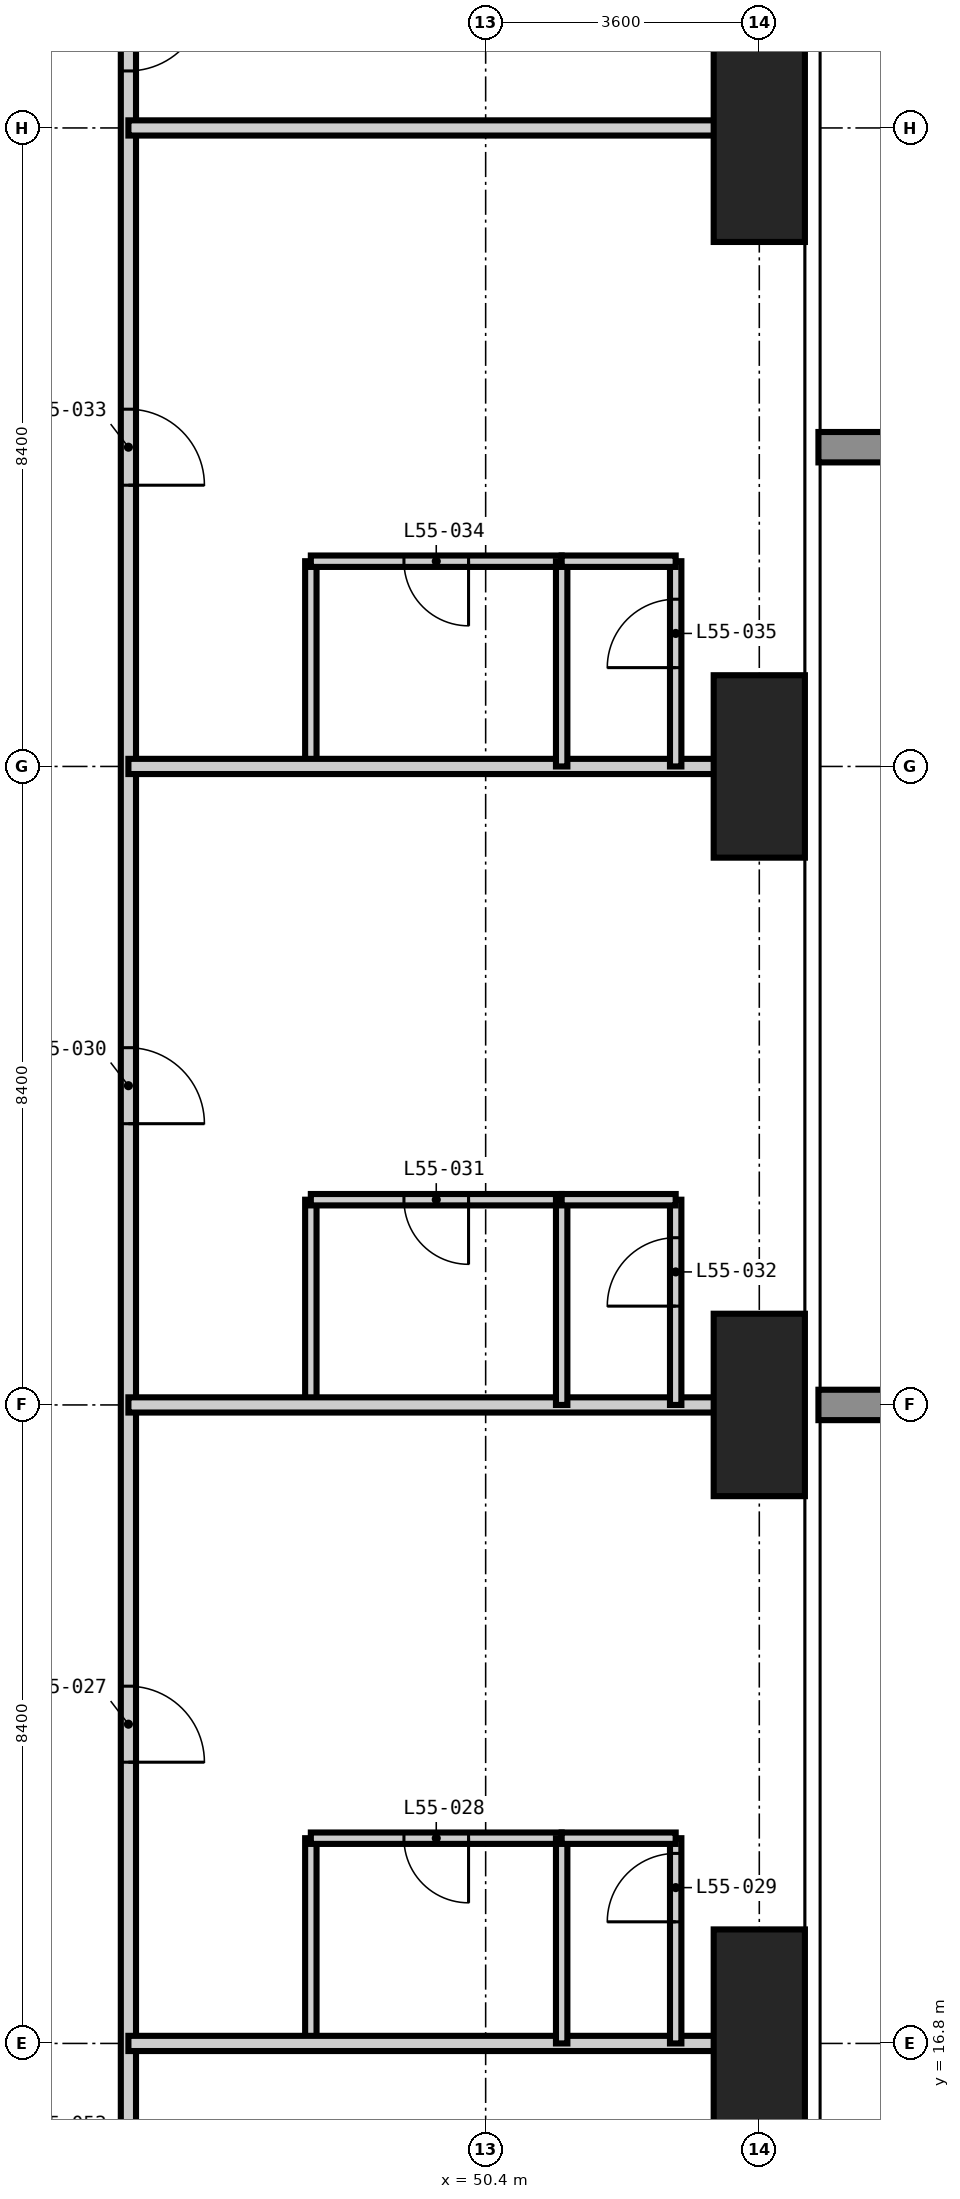
"""IFC4 building model, lengths in metres.
Left out: names, types, materials, properties, quantities, classifications, styles, units other than length and angle.
Written with IfcOpenShell. Run it as: python <this file> out.ifc"""

import sys

from ifc_helpers import new_model, si_unit, direction, frame, frame_2d, origin, origin_2d, place, context, subcontext, project, spatial, rectangle, extrude, element, fill, save


model = new_model("IFC4")
c1 = context("Model", 3, precision=1e-05, world=origin(), true_north=direction((0.0, 1.0)))
c2 = subcontext(c1, "Body", "Model", "MODEL_VIEW")
j1 = project(units=[si_unit("LENGTHUNIT", "METRE"), si_unit("PLANEANGLEUNIT", "RADIAN")], contexts=[c1])
p1 = place(None, origin())
s1 = spatial("IfcSite", under=j1, at=p1, CompositionType="ELEMENT")
p2 = place(p1, origin())
s2 = spatial("IfcBuilding", under=s1, at=p2, CompositionType="ELEMENT")
p3 = place(p2, frame((0.0, 0.0, 213.0)))
s3 = spatial("IfcBuildingStorey", under=s2, at=p3, CompositionType="ELEMENT", Elevation=213.0)
p4 = place(p3, frame((54.0, 16.8, -0.35), z_axis=(0.0, 0.0, 1.0), x_axis=(1.0, 0.0, 0.0)))
e1 = element("IfcColumn", 1, at=p4, inside=s3, PredefinedType="COLUMN", context=c2, shape_type="SweptSolid", body=[
    extrude(rectangle(XDim=1.2, YDim=3.0, at=origin_2d()), origin(), (0.0, 0.0, 1.0), 3.6),
])
for number, where, z_axis, x_axis in (
    (2, (54.0, 25.2, -0.35), (0.0, 0.0, 1.0), (1.0, 0.0, 0.0)),
    (3, (54.0, 33.6, -0.35), (0.0, 0.0, 1.0), (1.0, 0.0, 0.0)),
):
    element("IfcColumn", number, at=place(p3, frame(where, z_axis=z_axis, x_axis=x_axis)), inside=s3, PredefinedType="COLUMN", context=c2, shape_type="SweptSolid", body=[
        extrude(rectangle(XDim=1.2, YDim=2.4, at=origin_2d()), origin(), (0.0, 0.0, 1.0), 3.6),
    ])
p5 = place(p3, frame((54.0, 42.0, -0.35), z_axis=(0.0, 0.0, 1.0), x_axis=(1.0, 0.0, 0.0)))
e4 = element("IfcColumn", 4, at=p5, inside=s3, PredefinedType="COLUMN", context=c2, shape_type="SweptSolid", body=[
    extrude(rectangle(XDim=1.2, YDim=3.0, at=origin_2d()), origin(), (0.0, 0.0, 1.0), 3.6),
])
for number, where, z_axis, x_axis in (
    (5, (48.1, 16.8, 0.0), (0.0, 0.0, 1.0), (0.0, 1.0, 0.0)),
    (6, (48.1, 25.2, 0.0), (0.0, 0.0, 1.0), (0.0, 1.0, 0.0)),
    (7, (48.1, 33.6, 0.0), (0.0, 0.0, 1.0), (0.0, 1.0, 0.0)),
):
    element("IfcWall", number, at=place(p3, frame(where, z_axis=z_axis, x_axis=x_axis)), inside=s3, PredefinedType="PARTITIONING", context=c2, shape_type="SweptSolid", body=[
        extrude(rectangle(XDim=2.7, YDim=0.15, at=frame_2d((1.35, 0.0))), origin(), (0.0, 0.0, 1.0), 3.25),
    ])
p6 = place(p3, frame((48.1, 19.5, 0.0), z_axis=(0.0, 0.0, 1.0), x_axis=(1.0, 0.0, 0.0)))
e8 = element("IfcWall", 8, at=p6, inside=s3, PredefinedType="PARTITIONING", context=c2, shape_type="SweptSolid", body=[
    extrude(rectangle(XDim=3.3, YDim=0.15, at=frame_2d((1.65, 0.0))), origin(), (0.0, 0.0, 1.0), 3.25),
])
p7 = place(p6, frame((1.225, 0.0, 0.0)))
e9 = element("IfcOpeningElement", 9, at=p7, cuts=e8, PredefinedType="OPENING", context=c2, shape_type="SweptSolid", body=[
    extrude(rectangle(XDim=0.85, YDim=2.1, at=frame_2d((0.425, 1.05))), frame((0.0, 0.085, 0.0), z_axis=(0.0, -1.0, 0.0), x_axis=(1.0, 0.0, 0.0)), (0.0, 0.0, 1.0), 0.17),
])
p8 = place(p3, frame((48.1, 27.9, 0.0), z_axis=(0.0, 0.0, 1.0), x_axis=(1.0, 0.0, 0.0)))
e10 = element("IfcWall", 10, at=p8, inside=s3, PredefinedType="PARTITIONING", context=c2, shape_type="SweptSolid", body=[
    extrude(rectangle(XDim=3.3, YDim=0.15, at=frame_2d((1.65, 0.0))), origin(), (0.0, 0.0, 1.0), 3.25),
])
p9 = place(p8, frame((1.225, 0.0, 0.0)))
e11 = element("IfcOpeningElement", 11, at=p9, cuts=e10, PredefinedType="OPENING", context=c2, shape_type="SweptSolid", body=[
    extrude(rectangle(XDim=0.85, YDim=2.1, at=frame_2d((0.425, 1.05))), frame((0.0, 0.085, 0.0), z_axis=(0.0, -1.0, 0.0), x_axis=(1.0, 0.0, 0.0)), (0.0, 0.0, 1.0), 0.17),
])
p10 = place(p3, frame((48.1, 36.3, 0.0), z_axis=(0.0, 0.0, 1.0), x_axis=(1.0, 0.0, 0.0)))
e12 = element("IfcWall", 12, at=p10, inside=s3, PredefinedType="PARTITIONING", context=c2, shape_type="SweptSolid", body=[
    extrude(rectangle(XDim=3.3, YDim=0.15, at=frame_2d((1.65, 0.0))), origin(), (0.0, 0.0, 1.0), 3.25),
])
p11 = place(p10, frame((1.225, 0.0, 0.0)))
e13 = element("IfcOpeningElement", 13, at=p11, cuts=e12, PredefinedType="OPENING", context=c2, shape_type="SweptSolid", body=[
    extrude(rectangle(XDim=0.85, YDim=2.1, at=frame_2d((0.425, 1.05))), frame((0.0, 0.085, 0.0), z_axis=(0.0, -1.0, 0.0), x_axis=(1.0, 0.0, 0.0)), (0.0, 0.0, 1.0), 0.17),
])
p12 = place(p3, frame((45.7, 44.5, 0.0), z_axis=(0.0, 0.0, 1.0), x_axis=(0.0, -1.0, 0.0)))
e14 = element("IfcWall", 14, at=p12, inside=s3, PredefinedType="PARTITIONING", context=c2, shape_type="SweptSolid", body=[
    extrude(rectangle(XDim=30.8, YDim=0.2, at=frame_2d((15.4, 0.0))), origin(), (0.0, 0.0, 1.0), 3.25),
])
p13 = place(p12, frame((23.0, 0.0, 0.0)))
e15 = element("IfcOpeningElement", 15, at=p13, cuts=e14, PredefinedType="OPENING", context=c2, shape_type="SweptSolid", body=[
    extrude(rectangle(XDim=1.0, YDim=2.2, at=frame_2d((0.5, 1.1))), frame((0.0, 0.11, 0.0), z_axis=(0.0, -1.0, 0.0), x_axis=(1.0, 0.0, 0.0)), (0.0, 0.0, 1.0), 0.22),
])
p14 = place(p12, frame((14.6, 0.0, 0.0)))
e16 = element("IfcOpeningElement", 16, at=p14, cuts=e14, PredefinedType="OPENING", context=c2, shape_type="SweptSolid", body=[
    extrude(rectangle(XDim=1.0, YDim=2.2, at=frame_2d((0.5, 1.1))), frame((0.0, 0.11, 0.0), z_axis=(0.0, -1.0, 0.0), x_axis=(1.0, 0.0, 0.0)), (0.0, 0.0, 1.0), 0.22),
])
p15 = place(p12, frame((6.2, 0.0, 0.0)))
e17 = element("IfcOpeningElement", 17, at=p15, cuts=e14, PredefinedType="OPENING", context=c2, shape_type="SweptSolid", body=[
    extrude(rectangle(XDim=1.0, YDim=2.2, at=frame_2d((0.5, 1.1))), frame((0.0, 0.11, 0.0), z_axis=(0.0, -1.0, 0.0), x_axis=(1.0, 0.0, 0.0)), (0.0, 0.0, 1.0), 0.22),
])
p16 = place(p12, frame((28.75, 0.0, 0.0)))
e18 = element("IfcOpeningElement", 18, at=p16, cuts=e14, PredefinedType="OPENING", context=c2, shape_type="SweptSolid", body=[
    extrude(rectangle(XDim=1.0, YDim=2.2, at=frame_2d((0.5, 1.1))), frame((0.0, 0.11, 0.0), z_axis=(0.0, -1.0, 0.0), x_axis=(1.0, 0.0, 0.0)), (0.0, 0.0, 1.0), 0.22),
])
p17 = place(p12, frame((0.75, 0.0, 0.0)))
e19 = element("IfcOpeningElement", 19, at=p17, cuts=e14, PredefinedType="OPENING", context=c2, shape_type="SweptSolid", body=[
    extrude(rectangle(XDim=1.0, YDim=2.2, at=frame_2d((0.5, 1.1))), frame((0.0, 0.11, 0.0), z_axis=(0.0, -1.0, 0.0), x_axis=(1.0, 0.0, 0.0)), (0.0, 0.0, 1.0), 0.22),
])
for number, where, z_axis, x_axis in (
    (20, (45.7, 16.8, 0.0), (0.0, 0.0, 1.0), (1.0, 0.0, 0.0)),
    (21, (45.7, 25.2, 0.0), (0.0, 0.0, 1.0), (1.0, 0.0, 0.0)),
    (22, (45.7, 33.6, 0.0), (0.0, 0.0, 1.0), (1.0, 0.0, 0.0)),
    (23, (45.7, 42.0, 0.0), (0.0, 0.0, 1.0), (1.0, 0.0, 0.0)),
):
    element("IfcWall", number, at=place(p3, frame(where, z_axis=z_axis, x_axis=x_axis)), inside=s3, PredefinedType="PARTITIONING", context=c2, shape_type="SweptSolid", body=[
        extrude(rectangle(XDim=8.918, YDim=0.2, at=frame_2d((4.459, 0.0))), origin(), (0.0, 0.0, 1.0), 3.25),
    ])
for number, where, z_axis, x_axis in (
    (24, (51.4, 16.8, 0.0), (0.0, 0.0, 1.0), (0.0, 1.0, 0.0)),
    (25, (51.4, 25.2, 0.0), (0.0, 0.0, 1.0), (0.0, 1.0, 0.0)),
    (26, (51.4, 33.6, 0.0), (0.0, 0.0, 1.0), (0.0, 1.0, 0.0)),
):
    element("IfcWall", number, at=place(p3, frame(where, z_axis=z_axis, x_axis=x_axis)), inside=s3, PredefinedType="PARTITIONING", context=c2, shape_type="SweptSolid", body=[
        extrude(rectangle(XDim=2.7, YDim=0.15, at=frame_2d((1.35, 0.0))), origin(), (0.0, 0.0, 1.0), 3.25),
    ])
p18 = place(p3, frame((52.9, 16.8, 0.0), z_axis=(0.0, 0.0, 1.0), x_axis=(0.0, 1.0, 0.0)))
e27 = element("IfcWall", 27, at=p18, inside=s3, PredefinedType="PARTITIONING", context=c2, shape_type="SweptSolid", body=[
    extrude(rectangle(XDim=2.7, YDim=0.15, at=frame_2d((1.35, 0.0))), origin(), (0.0, 0.0, 1.0), 3.25),
])
p19 = place(p18, frame((1.6, 0.0, 0.0)))
e28 = element("IfcOpeningElement", 28, at=p19, cuts=e27, PredefinedType="OPENING", context=c2, shape_type="SweptSolid", body=[
    extrude(rectangle(XDim=0.9, YDim=2.1, at=frame_2d((0.45, 1.05))), frame((0.0, 0.085, 0.0), z_axis=(0.0, -1.0, 0.0), x_axis=(1.0, 0.0, 0.0)), (0.0, 0.0, 1.0), 0.17),
])
p20 = place(p3, frame((52.9, 25.2, 0.0), z_axis=(0.0, 0.0, 1.0), x_axis=(0.0, 1.0, 0.0)))
e29 = element("IfcWall", 29, at=p20, inside=s3, PredefinedType="PARTITIONING", context=c2, shape_type="SweptSolid", body=[
    extrude(rectangle(XDim=2.7, YDim=0.15, at=frame_2d((1.35, 0.0))), origin(), (0.0, 0.0, 1.0), 3.25),
])
p21 = place(p20, frame((1.3, 0.0, 0.0)))
e30 = element("IfcOpeningElement", 30, at=p21, cuts=e29, PredefinedType="OPENING", context=c2, shape_type="SweptSolid", body=[
    extrude(rectangle(XDim=0.9, YDim=2.1, at=frame_2d((0.45, 1.05))), frame((0.0, 0.085, 0.0), z_axis=(0.0, -1.0, 0.0), x_axis=(1.0, 0.0, 0.0)), (0.0, 0.0, 1.0), 0.17),
])
p22 = place(p3, frame((52.9, 33.6, 0.0), z_axis=(0.0, 0.0, 1.0), x_axis=(0.0, 1.0, 0.0)))
e31 = element("IfcWall", 31, at=p22, inside=s3, PredefinedType="PARTITIONING", context=c2, shape_type="SweptSolid", body=[
    extrude(rectangle(XDim=2.7, YDim=0.15, at=frame_2d((1.35, 0.0))), origin(), (0.0, 0.0, 1.0), 3.25),
])
p23 = place(p22, frame((1.3, 0.0, 0.0)))
e32 = element("IfcOpeningElement", 32, at=p23, cuts=e31, PredefinedType="OPENING", context=c2, shape_type="SweptSolid", body=[
    extrude(rectangle(XDim=0.9, YDim=2.1, at=frame_2d((0.45, 1.05))), frame((0.0, 0.085, 0.0), z_axis=(0.0, -1.0, 0.0), x_axis=(1.0, 0.0, 0.0)), (0.0, 0.0, 1.0), 0.17),
])
for number, where, z_axis, x_axis in (
    (33, (51.4, 19.5, 0.0), (0.0, 0.0, 1.0), (1.0, 0.0, 0.0)),
    (34, (51.4, 27.9, 0.0), (0.0, 0.0, 1.0), (1.0, 0.0, 0.0)),
    (35, (51.4, 36.3, 0.0), (0.0, 0.0, 1.0), (1.0, 0.0, 0.0)),
):
    element("IfcWall", number, at=place(p3, frame(where, z_axis=z_axis, x_axis=x_axis)), inside=s3, PredefinedType="PARTITIONING", context=c2, shape_type="SweptSolid", body=[
        extrude(rectangle(XDim=1.5, YDim=0.15, at=frame_2d((0.75, 0.0))), origin(), (0.0, 0.0, 1.0), 3.25),
    ])
p24 = place(p13, origin())
e36 = element("IfcDoor", 36, at=p24, inside=s3, OperationType="SINGLE_SWING_RIGHT", PredefinedType="DOOR", context=c2, shape_type="SweptSolid", body=[
    extrude(rectangle(XDim=1.0, YDim=2.2, at=frame_2d((0.5, 1.1))), frame((0.0, 0.025, 0.0), z_axis=(0.0, -1.0, 0.0), x_axis=(1.0, 0.0, 0.0)), (0.0, 0.0, 1.0), 0.05),
])
fill(e15, e36)
p25 = place(p7, frame((0.85, 0.0, 0.0), z_axis=(0.0, 0.0, 1.0), x_axis=(-1.0, 0.0, 0.0)))
e37 = element("IfcDoor", 37, at=p25, inside=s3, OperationType="SINGLE_SWING_LEFT", PredefinedType="DOOR", context=c2, shape_type="SweptSolid", body=[
    extrude(rectangle(XDim=0.85, YDim=2.1, at=frame_2d((0.425, 1.05))), frame((0.0, 0.025, 0.0), z_axis=(0.0, -1.0, 0.0), x_axis=(1.0, 0.0, 0.0)), (0.0, 0.0, 1.0), 0.05),
])
fill(e9, e37)
p26 = place(p19, origin())
e38 = element("IfcDoor", 38, at=p26, inside=s3, OperationType="SINGLE_SWING_LEFT", PredefinedType="DOOR", context=c2, shape_type="SweptSolid", body=[
    extrude(rectangle(XDim=0.9, YDim=2.1, at=frame_2d((0.45, 1.05))), frame((0.0, 0.025, 0.0), z_axis=(0.0, -1.0, 0.0), x_axis=(1.0, 0.0, 0.0)), (0.0, 0.0, 1.0), 0.05),
])
fill(e28, e38)
p27 = place(p14, origin())
e39 = element("IfcDoor", 39, at=p27, inside=s3, OperationType="SINGLE_SWING_RIGHT", PredefinedType="DOOR", context=c2, shape_type="SweptSolid", body=[
    extrude(rectangle(XDim=1.0, YDim=2.2, at=frame_2d((0.5, 1.1))), frame((0.0, 0.025, 0.0), z_axis=(0.0, -1.0, 0.0), x_axis=(1.0, 0.0, 0.0)), (0.0, 0.0, 1.0), 0.05),
])
fill(e16, e39)
p28 = place(p9, frame((0.85, 0.0, 0.0), z_axis=(0.0, 0.0, 1.0), x_axis=(-1.0, 0.0, 0.0)))
e40 = element("IfcDoor", 40, at=p28, inside=s3, OperationType="SINGLE_SWING_LEFT", PredefinedType="DOOR", context=c2, shape_type="SweptSolid", body=[
    extrude(rectangle(XDim=0.85, YDim=2.1, at=frame_2d((0.425, 1.05))), frame((0.0, 0.025, 0.0), z_axis=(0.0, -1.0, 0.0), x_axis=(1.0, 0.0, 0.0)), (0.0, 0.0, 1.0), 0.05),
])
fill(e11, e40)
p29 = place(p21, origin())
e41 = element("IfcDoor", 41, at=p29, inside=s3, OperationType="SINGLE_SWING_LEFT", PredefinedType="DOOR", context=c2, shape_type="SweptSolid", body=[
    extrude(rectangle(XDim=0.9, YDim=2.1, at=frame_2d((0.45, 1.05))), frame((0.0, 0.025, 0.0), z_axis=(0.0, -1.0, 0.0), x_axis=(1.0, 0.0, 0.0)), (0.0, 0.0, 1.0), 0.05),
])
fill(e30, e41)
p30 = place(p15, origin())
e42 = element("IfcDoor", 42, at=p30, inside=s3, OperationType="SINGLE_SWING_RIGHT", PredefinedType="DOOR", context=c2, shape_type="SweptSolid", body=[
    extrude(rectangle(XDim=1.0, YDim=2.2, at=frame_2d((0.5, 1.1))), frame((0.0, 0.025, 0.0), z_axis=(0.0, -1.0, 0.0), x_axis=(1.0, 0.0, 0.0)), (0.0, 0.0, 1.0), 0.05),
])
fill(e17, e42)
p31 = place(p11, frame((0.85, 0.0, 0.0), z_axis=(0.0, 0.0, 1.0), x_axis=(-1.0, 0.0, 0.0)))
e43 = element("IfcDoor", 43, at=p31, inside=s3, OperationType="SINGLE_SWING_LEFT", PredefinedType="DOOR", context=c2, shape_type="SweptSolid", body=[
    extrude(rectangle(XDim=0.85, YDim=2.1, at=frame_2d((0.425, 1.05))), frame((0.0, 0.025, 0.0), z_axis=(0.0, -1.0, 0.0), x_axis=(1.0, 0.0, 0.0)), (0.0, 0.0, 1.0), 0.05),
])
fill(e13, e43)
p32 = place(p23, origin())
e44 = element("IfcDoor", 44, at=p32, inside=s3, OperationType="SINGLE_SWING_LEFT", PredefinedType="DOOR", context=c2, shape_type="SweptSolid", body=[
    extrude(rectangle(XDim=0.9, YDim=2.1, at=frame_2d((0.45, 1.05))), frame((0.0, 0.025, 0.0), z_axis=(0.0, -1.0, 0.0), x_axis=(1.0, 0.0, 0.0)), (0.0, 0.0, 1.0), 0.05),
])
fill(e32, e44)
p33 = place(p17, origin())
e45 = element("IfcDoor", 45, at=p33, inside=s3, OperationType="SINGLE_SWING_LEFT", PredefinedType="DOOR", context=c2, shape_type="SweptSolid", body=[
    extrude(rectangle(XDim=1.0, YDim=2.2, at=frame_2d((0.5, 1.1))), frame((0.0, 0.025, 0.0), z_axis=(0.0, -1.0, 0.0), x_axis=(1.0, 0.0, 0.0)), (0.0, 0.0, 1.0), 0.05),
])
fill(e19, e45)
save(model, sys.argv[1])
